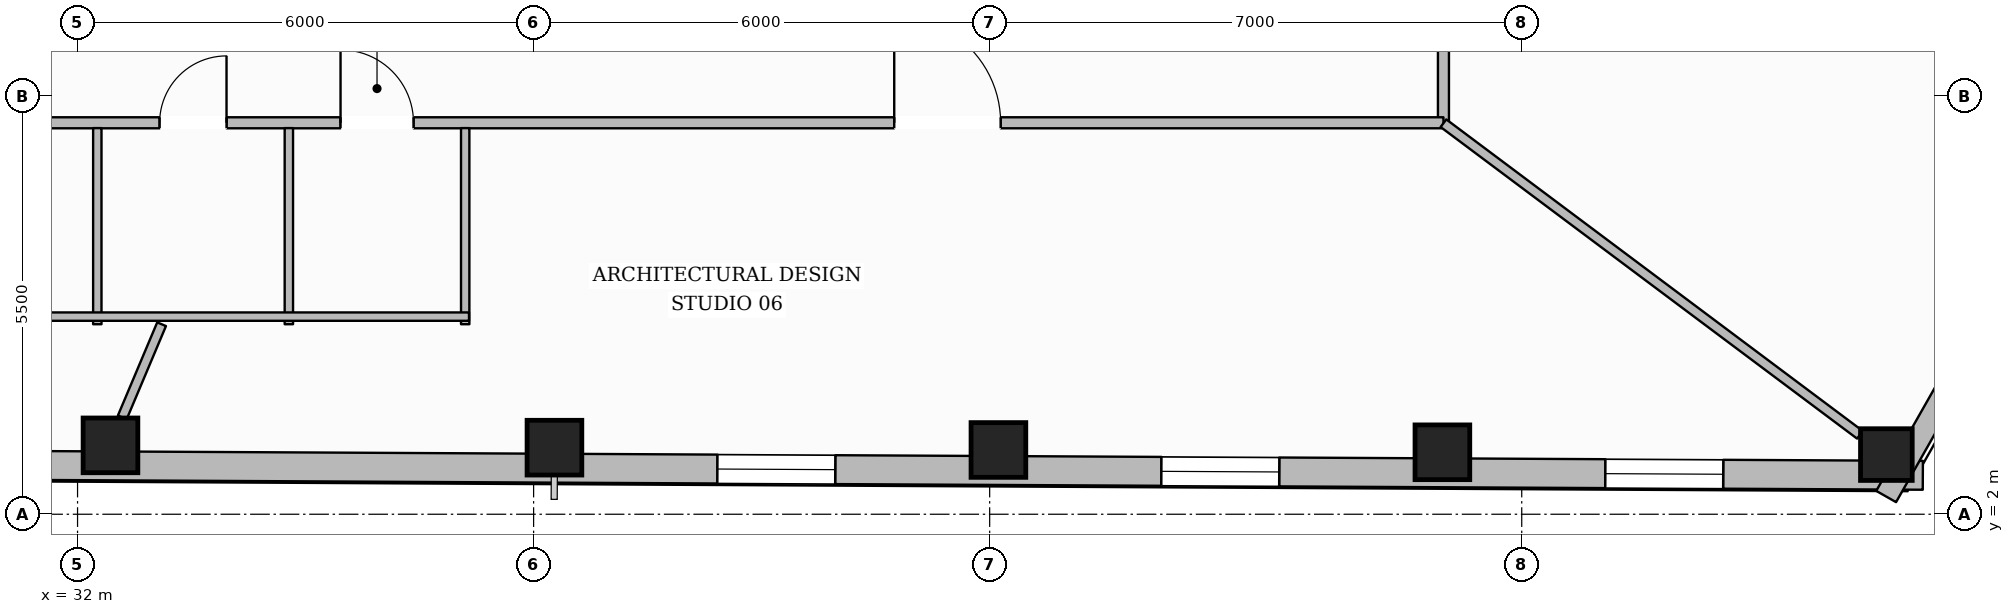
"""IFC4 building model, lengths in metres.
Left out: names, types, materials, properties, quantities, classifications, styles, units other than length and angle.
Written with IfcOpenShell. Run it as: python <this file> out.ifc"""

import sys

from ifc_helpers import new_model, si_unit, direction, frame, frame_2d, origin, origin_2d, place, context, subcontext, project, spatial, rectangle, hollow_rectangle, extrude, element, fill, save


model = new_model("IFC4")
c1 = context("Model", 3, precision=1e-05, world=origin(), true_north=direction((0.0, 1.0)))
c2 = subcontext(c1, "Body", "Model", "MODEL_VIEW")
j1 = project(units=[si_unit("LENGTHUNIT", "METRE"), si_unit("PLANEANGLEUNIT", "RADIAN")], contexts=[c1])
p1 = place(None, origin())
s1 = spatial("IfcSite", under=j1, at=p1, CompositionType="ELEMENT")
p2 = place(p1, origin())
s2 = spatial("IfcBuilding", under=s1, at=p2, CompositionType="ELEMENT")
p3 = place(p2, frame((0.0, 0.0, 104.75)))
s3 = spatial("IfcBuildingStorey", under=s2, at=p3, CompositionType="ELEMENT", Elevation=104.75)
for number, where, z_axis, x_axis in (
    (1, (32.433, 2.906, 0.0), (0.0, 0.0, 1.0), (1.0, 0.0, 0.0)),
    (2, (38.274, 2.876, 0.0), (0.0, 0.0, 1.0), (1.0, 0.0, 0.0)),
    (3, (44.115, 2.845, 0.0), (0.0, 0.0, 1.0), (1.0, 0.0, 0.0)),
    (4, (49.956, 2.815, 0.0), (0.0, 0.0, 1.0), (1.0, 0.0, 0.0)),
):
    element("IfcColumn", number, at=place(p3, frame(where, z_axis=z_axis, x_axis=x_axis)), inside=s3, PredefinedType="COLUMN", context=c2, shape_type="SweptSolid", body=[
        extrude(hollow_rectangle(XDim=0.72, YDim=0.72, WallThickness=0.032, at=origin_2d()), origin(), (0.0, 0.0, 1.0), 3.6),
    ])
p4 = place(p3, frame((55.797, 2.785, 0.0), z_axis=(0.0, 0.0, 1.0), x_axis=(1.0, 0.0, 0.0)))
e5 = element("IfcColumn", 5, at=p4, inside=s3, PredefinedType="COLUMN", context=c2, shape_type="SweptSolid", body=[
    extrude(hollow_rectangle(XDim=0.68, YDim=0.68, WallThickness=0.03, at=origin_2d()), origin(), (0.0, 0.0, 1.0), 3.6),
])
p5 = place(p3, frame((56.277, 2.512, 0.0), z_axis=(0.0, 0.0, 1.0), x_axis=(-0.999986545033, 0.005187461141, 0.0)))
e6 = element("IfcWall", 6, at=p5, inside=s3, PredefinedType="STANDARD", context=c2, shape_type="SweptSolid", body=[
    extrude(rectangle(XDim=36.004, YDim=0.38, at=frame_2d((18.002, 0.0))), origin(), (0.0, 0.0, 1.0), 3.059),
])
p6 = place(p5, frame((31.832, 0.0, 0.65)))
e7 = element("IfcOpeningElement", 7, at=p6, cuts=e6, PredefinedType="OPENING", context=c2, shape_type="SweptSolid", body=[
    extrude(rectangle(XDim=1.55, YDim=1.75, at=frame_2d((0.775, 0.875))), frame((0.0, 0.2, 0.0), z_axis=(0.0, -1.0, 0.0), x_axis=(1.0, 0.0, 0.0)), (0.0, 0.0, 1.0), 0.4),
])
p7 = place(p5, frame((25.991, 0.0, 0.65)))
e8 = element("IfcOpeningElement", 8, at=p7, cuts=e6, PredefinedType="OPENING", context=c2, shape_type="SweptSolid", body=[
    extrude(rectangle(XDim=1.55, YDim=1.75, at=frame_2d((0.775, 0.875))), frame((0.0, 0.2, 0.0), z_axis=(0.0, -1.0, 0.0), x_axis=(1.0, 0.0, 0.0)), (0.0, 0.0, 1.0), 0.4),
])
p8 = place(p5, frame((14.309, 0.0, 0.65)))
e9 = element("IfcOpeningElement", 9, at=p8, cuts=e6, PredefinedType="OPENING", context=c2, shape_type="SweptSolid", body=[
    extrude(rectangle(XDim=1.55, YDim=1.75, at=frame_2d((0.775, 0.875))), frame((0.0, 0.2, 0.0), z_axis=(0.0, -1.0, 0.0), x_axis=(1.0, 0.0, 0.0)), (0.0, 0.0, 1.0), 0.4),
])
p9 = place(p5, frame((8.468, 0.0, 0.65)))
e10 = element("IfcOpeningElement", 10, at=p9, cuts=e6, PredefinedType="OPENING", context=c2, shape_type="SweptSolid", body=[
    extrude(rectangle(XDim=1.55, YDim=1.75, at=frame_2d((0.775, 0.875))), frame((0.0, 0.2, 0.0), z_axis=(0.0, -1.0, 0.0), x_axis=(1.0, 0.0, 0.0)), (0.0, 0.0, 1.0), 0.4),
])
p10 = place(p5, frame((2.627, 0.0, 0.65)))
e11 = element("IfcOpeningElement", 11, at=p10, cuts=e6, PredefinedType="OPENING", context=c2, shape_type="SweptSolid", body=[
    extrude(rectangle(XDim=1.55, YDim=1.75, at=frame_2d((0.775, 0.875))), frame((0.0, 0.2, 0.0), z_axis=(0.0, -1.0, 0.0), x_axis=(1.0, 0.0, 0.0)), (0.0, 0.0, 1.0), 0.4),
])
p11 = place(p3, frame((62.28, 13.652, 0.0), z_axis=(0.0, 0.0, 1.0), x_axis=(-0.493862788891, -0.869539847131, 0.0)))
e12 = element("IfcWall", 12, at=p11, inside=s3, PredefinedType="STANDARD", context=c2, shape_type="SweptSolid", body=[
    extrude(rectangle(XDim=13.132, YDim=0.3, at=frame_2d((6.566, 0.0))), origin(), (0.0, 0.0, 1.0), 3.059),
])
p12 = place(p11, frame((5.966, 0.0, 0.65)))
e13 = element("IfcOpeningElement", 13, at=p12, cuts=e12, PredefinedType="OPENING", context=c2, shape_type="SweptSolid", body=[
    extrude(rectangle(XDim=1.2, YDim=1.7, at=frame_2d((0.6, 0.85))), frame((0.0, 0.16, 0.0), z_axis=(0.0, -1.0, 0.0), x_axis=(1.0, 0.0, 0.0)), (0.0, 0.0, 1.0), 0.32),
])
p13 = place(p3, frame((49.97, 7.15, 0.0), z_axis=(0.0, 0.0, 1.0), x_axis=(0.0, 1.0, 0.0)))
e14 = element("IfcWall", 14, at=p13, inside=s3, PredefinedType="PARTITIONING", context=c2, shape_type="SweptSolid", body=[
    extrude(rectangle(XDim=17.9, YDim=0.145, at=frame_2d((8.95, 0.0))), origin(), (0.0, 0.0, 1.0), 3.288),
])
p14 = place(p13, frame((8.25, 0.0, 0.0)))
e15 = element("IfcOpeningElement", 15, at=p14, cuts=e14, PredefinedType="OPENING", context=c2, shape_type="SweptSolid", body=[
    extrude(rectangle(XDim=1.4, YDim=2.2, at=frame_2d((0.7, 1.1))), frame((0.0, 0.083, 0.0), z_axis=(0.0, -1.0, 0.0), x_axis=(1.0, 0.0, 0.0)), (0.0, 0.0, 1.0), 0.165),
])
p15 = place(p3, frame((26.03, 7.15, 0.0), z_axis=(0.0, 0.0, 1.0), x_axis=(1.0, 0.0, 0.0)))
e16 = element("IfcWall", 16, at=p15, inside=s3, PredefinedType="PARTITIONING", context=c2, shape_type="SweptSolid", body=[
    extrude(rectangle(XDim=23.94, YDim=0.145, at=frame_2d((11.97, 0.0))), origin(), (0.0, 0.0, 1.0), 3.6),
])
p16 = place(p15, frame((4.53, 0.0, 0.0)))
e17 = element("IfcOpeningElement", 17, at=p16, cuts=e16, PredefinedType="OPENING", context=c2, shape_type="SweptSolid", body=[
    extrude(rectangle(XDim=0.88, YDim=2.1, at=frame_2d((0.44, 1.05))), frame((0.0, 0.083, 0.0), z_axis=(0.0, -1.0, 0.0), x_axis=(1.0, 0.0, 0.0)), (0.0, 0.0, 1.0), 0.165),
])
p17 = place(p15, frame((7.05, 0.0, 0.0)))
e18 = element("IfcOpeningElement", 18, at=p17, cuts=e16, PredefinedType="OPENING", context=c2, shape_type="SweptSolid", body=[
    extrude(rectangle(XDim=0.88, YDim=2.1, at=frame_2d((0.44, 1.05))), frame((0.0, 0.083, 0.0), z_axis=(0.0, -1.0, 0.0), x_axis=(1.0, 0.0, 0.0)), (0.0, 0.0, 1.0), 0.165),
])
p18 = place(p15, frame((9.43, 0.0, 0.0)))
e19 = element("IfcOpeningElement", 19, at=p18, cuts=e16, PredefinedType="OPENING", context=c2, shape_type="SweptSolid", body=[
    extrude(rectangle(XDim=0.96, YDim=2.1, at=frame_2d((0.48, 1.05))), frame((0.0, 0.083, 0.0), z_axis=(0.0, -1.0, 0.0), x_axis=(1.0, 0.0, 0.0)), (0.0, 0.0, 1.0), 0.165),
])
p19 = place(p15, frame((1.456, 0.0, 0.0)))
e20 = element("IfcOpeningElement", 20, at=p19, cuts=e16, PredefinedType="OPENING", context=c2, shape_type="SweptSolid", body=[
    extrude(rectangle(XDim=0.98, YDim=2.15, at=frame_2d((0.49, 1.075))), frame((0.0, 0.083, 0.0), z_axis=(0.0, -1.0, 0.0), x_axis=(1.0, 0.0, 0.0)), (0.0, 0.0, 1.0), 0.165),
])
p20 = place(p15, frame((16.714, 0.0, 0.0)))
e21 = element("IfcOpeningElement", 21, at=p20, cuts=e16, PredefinedType="OPENING", context=c2, shape_type="SweptSolid", body=[
    extrude(rectangle(XDim=1.4, YDim=2.2, at=frame_2d((0.7, 1.1))), frame((0.0, 0.083, 0.0), z_axis=(0.0, -1.0, 0.0), x_axis=(1.0, 0.0, 0.0)), (0.0, 0.0, 1.0), 0.165),
])
p21 = place(p3, frame((32.26, 4.5, 0.0), z_axis=(0.0, 0.0, 1.0), x_axis=(0.0, 1.0, 0.0)))
e22 = element("IfcWall", 22, at=p21, inside=s3, PredefinedType="PLUMBINGWALL", context=c2, shape_type="SweptSolid", body=[
    extrude(rectangle(XDim=2.58, YDim=0.11, at=frame_2d((1.29, 0.0))), origin(), (0.0, 0.0, 1.0), 3.141),
])
for number, where, z_axis, x_axis in (
    (23, (34.78, 4.5, 0.0), (0.0, 0.0, 1.0), (0.0, 1.0, 0.0)),
    (24, (37.1, 4.5, 0.0), (0.0, 0.0, 1.0), (0.0, 1.0, 0.0)),
):
    element("IfcWall", number, at=place(p3, frame(where, z_axis=z_axis, x_axis=x_axis)), inside=s3, PredefinedType="PLUMBINGWALL", context=c2, shape_type="SweptSolid", body=[
        extrude(rectangle(XDim=2.58, YDim=0.11, at=frame_2d((1.29, 0.0))), origin(), (0.0, 0.0, 1.0), 3.6),
    ])
p22 = place(p3, frame((29.69, 4.6, 0.0), z_axis=(0.0, 0.0, 1.0), x_axis=(1.0, 0.0, 0.0)))
e25 = element("IfcWall", 25, at=p22, inside=s3, PredefinedType="PLUMBINGWALL", context=c2, shape_type="SweptSolid", body=[
    extrude(rectangle(XDim=7.46, YDim=0.11, at=frame_2d((3.73, 0.0))), origin(), (0.0, 0.0, 1.0), 3.6),
])
p23 = place(p3, frame((33.106, 4.5, 0.0), z_axis=(0.0, 0.0, 1.0), x_axis=(-0.388819762507, -0.921313840276, 0.0)))
e26 = element("IfcWall", 26, at=p23, inside=s3, PredefinedType="PARTITIONING", context=c2, shape_type="SweptSolid", body=[
    extrude(rectangle(XDim=1.331, YDim=0.125, at=frame_2d((0.665, 0.0))), origin(), (0.0, 0.0, 1.0), 3.6),
])
p24 = place(p3, frame((49.97, 7.145, 0.0), z_axis=(0.0, 0.0, 1.0), x_axis=(0.800705856265, -0.599057703183, 0.0)))
e27 = element("IfcWall", 27, at=p24, inside=s3, PredefinedType="PARTITIONING", context=c2, shape_type="SweptSolid", body=[
    extrude(rectangle(XDim=6.843, YDim=0.125, at=frame_2d((3.421, 0.0))), origin(), (0.0, 0.0, 1.0), 3.141),
])
p25 = place(p8, origin())
e28 = element("IfcWindow", 28, at=p25, inside=s3, PartitioningType="SINGLE_PANEL", PredefinedType="WINDOW", context=c2, shape_type="SweptSolid", body=[
    extrude(rectangle(XDim=1.55, YDim=1.75, at=frame_2d((0.775, 0.875))), frame((0.0, 0.03, 0.0), z_axis=(0.0, -1.0, 0.0), x_axis=(1.0, 0.0, 0.0)), (0.0, 0.0, 1.0), 0.06),
])
fill(e9, e28)
p26 = place(p9, origin())
e29 = element("IfcWindow", 29, at=p26, inside=s3, PartitioningType="SINGLE_PANEL", PredefinedType="WINDOW", context=c2, shape_type="SweptSolid", body=[
    extrude(rectangle(XDim=1.55, YDim=1.75, at=frame_2d((0.775, 0.875))), frame((0.0, 0.03, 0.0), z_axis=(0.0, -1.0, 0.0), x_axis=(1.0, 0.0, 0.0)), (0.0, 0.0, 1.0), 0.06),
])
fill(e10, e29)
p27 = place(p10, origin())
e30 = element("IfcWindow", 30, at=p27, inside=s3, PartitioningType="SINGLE_PANEL", PredefinedType="WINDOW", context=c2, shape_type="SweptSolid", body=[
    extrude(rectangle(XDim=1.55, YDim=1.75, at=frame_2d((0.775, 0.875))), frame((0.0, 0.03, 0.0), z_axis=(0.0, -1.0, 0.0), x_axis=(1.0, 0.0, 0.0)), (0.0, 0.0, 1.0), 0.06),
])
fill(e11, e30)
p28 = place(p17, origin())
e31 = element("IfcDoor", 31, at=p28, inside=s3, OperationType="SINGLE_SWING_RIGHT", PredefinedType="DOOR", context=c2, shape_type="SweptSolid", body=[
    extrude(rectangle(XDim=0.88, YDim=2.1, at=frame_2d((0.44, 1.05))), frame((0.0, 0.025, 0.0), z_axis=(0.0, -1.0, 0.0), x_axis=(1.0, 0.0, 0.0)), (0.0, 0.0, 1.0), 0.05),
])
fill(e18, e31)
p29 = place(p18, origin())
e32 = element("IfcDoor", 32, at=p29, inside=s3, OperationType="SINGLE_SWING_LEFT", PredefinedType="DOOR", context=c2, shape_type="SweptSolid", body=[
    extrude(rectangle(XDim=0.96, YDim=2.1, at=frame_2d((0.48, 1.05))), frame((0.0, 0.025, 0.0), z_axis=(0.0, -1.0, 0.0), x_axis=(1.0, 0.0, 0.0)), (0.0, 0.0, 1.0), 0.05),
])
fill(e19, e32)
p30 = place(p20, origin())
e33 = element("IfcDoor", 33, at=p30, inside=s3, OperationType="SINGLE_SWING_LEFT", PredefinedType="DOOR", context=c2, shape_type="SweptSolid", body=[
    extrude(rectangle(XDim=1.4, YDim=2.2, at=frame_2d((0.7, 1.1))), frame((0.0, 0.025, 0.0), z_axis=(0.0, -1.0, 0.0), x_axis=(1.0, 0.0, 0.0)), (0.0, 0.0, 1.0), 0.05),
])
fill(e21, e33)
save(model, sys.argv[1])
